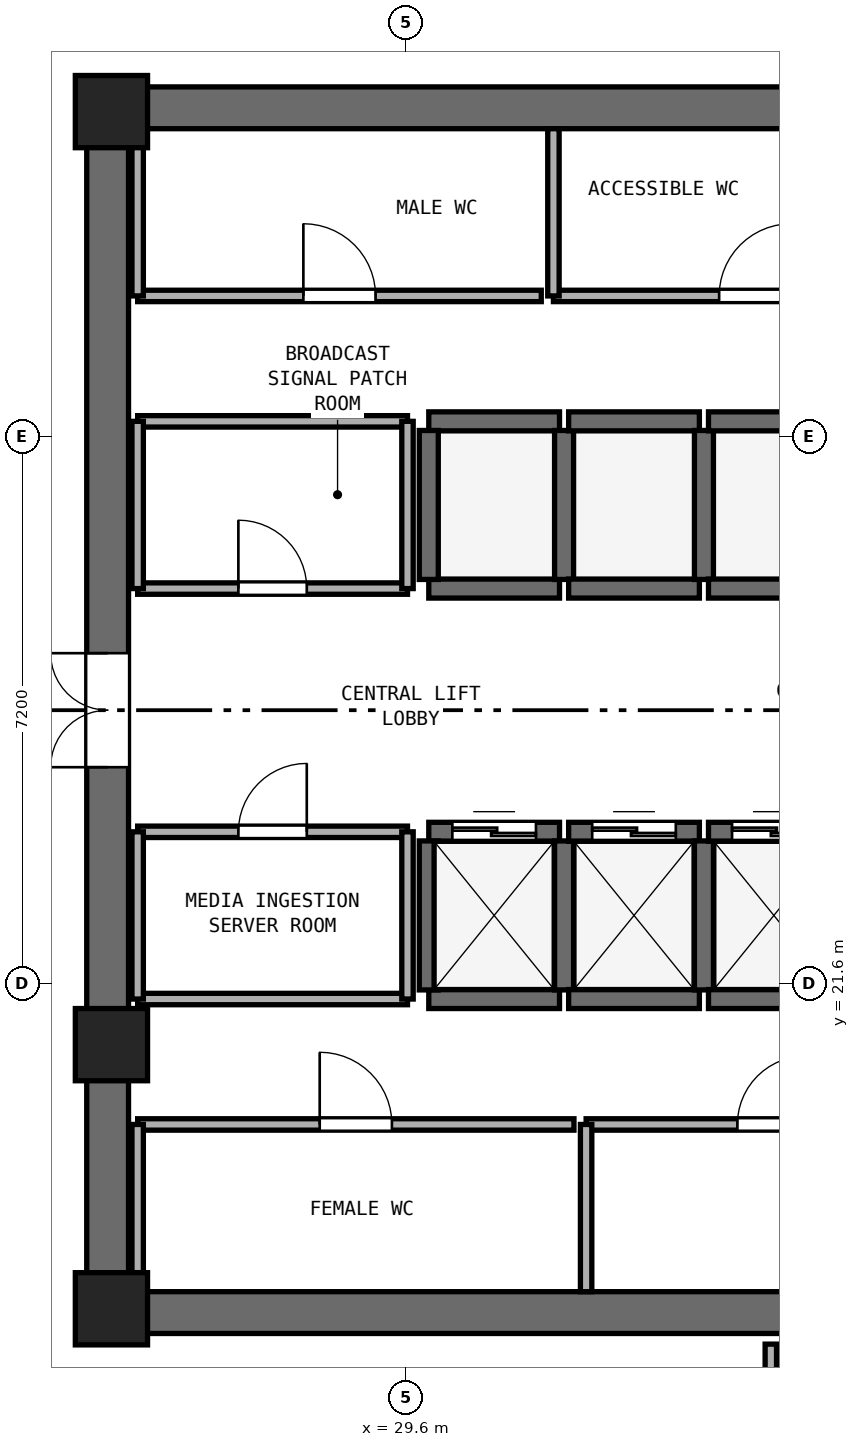
"""IFC4 building model, lengths in metres.
Left out: names, types, materials, properties, quantities, classifications, styles, units other than length and angle.
Written with IfcOpenShell. Run it as: python <this file> out.ifc"""

import sys

from ifc_helpers import new_model, si_unit, direction, frame, frame_2d, origin, origin_2d, place, context, subcontext, project, spatial, rectangle, extrude, element, fill, save


model = new_model("IFC4")
c1 = context("Model", 3, precision=1e-05, world=origin(), true_north=direction((0.0, 1.0)))
c2 = subcontext(c1, "Body", "Model", "MODEL_VIEW")
j1 = project(units=[si_unit("LENGTHUNIT", "METRE"), si_unit("PLANEANGLEUNIT", "RADIAN")], contexts=[c1])
p1 = place(None, origin())
s1 = spatial("IfcSite", under=j1, at=p1, CompositionType="ELEMENT")
p2 = place(p1, origin())
s2 = spatial("IfcBuilding", under=s1, at=p2, CompositionType="ELEMENT")
p3 = place(p2, frame((0.0, 0.0, 201.0)))
s3 = spatial("IfcBuildingStorey", under=s2, at=p3, CompositionType="ELEMENT", Elevation=201.0)
for number, where, z_axis, x_axis in (
    (1, (25.4, 17.275, 0.0), (0.0, 0.0, 1.0), (1.0, 0.0, 0.0)),
    (2, (25.4, 33.125, 0.0), (0.0, 0.0, 1.0), (1.0, 0.0, 0.0)),
):
    element("IfcWall", number, at=place(p3, frame(where, z_axis=z_axis, x_axis=x_axis)), inside=s3, PredefinedType="SHEAR", context=c2, shape_type="SweptSolid", body=[
        extrude(rectangle(XDim=23.2, YDim=0.55, at=frame_2d((11.6, 0.0))), origin(), (0.0, 0.0, 1.0), 3.54),
    ])
p4 = place(p3, frame((25.675, 17.55, 0.0), z_axis=(0.0, 0.0, 1.0), x_axis=(0.0, 1.0, 0.0)))
e3 = element("IfcWall", 3, at=p4, inside=s3, PredefinedType="SHEAR", context=c2, shape_type="SweptSolid", body=[
    extrude(rectangle(XDim=15.3, YDim=0.55, at=frame_2d((7.65, 0.0))), origin(), (0.0, 0.0, 1.0), 3.54),
])
p5 = place(p4, frame((6.9, 0.0, 0.0)))
e4 = element("IfcOpeningElement", 4, at=p5, cuts=e3, PredefinedType="OPENING", context=c2, shape_type="SweptSolid", body=[
    extrude(rectangle(XDim=1.5, YDim=2.15, at=frame_2d((0.75, 1.075))), frame((0.0, 0.285, 0.0), z_axis=(0.0, -1.0, 0.0), x_axis=(1.0, 0.0, 0.0)), (0.0, 0.0, 1.0), 0.57),
])
for number, where, z_axis, x_axis in (
    (5, (25.725, 17.325, 0.0), (0.0, 0.0, 1.0), (1.0, 0.0, 0.0)),
    (6, (25.725, 33.075, 0.0), (0.0, 0.0, 1.0), (1.0, 0.0, 0.0)),
    (7, (25.725, 20.8, 0.0), (0.0, 0.0, 1.0), (1.0, 0.0, 0.0)),
):
    element("IfcColumn", number, at=place(p3, frame(where, z_axis=z_axis, x_axis=x_axis)), inside=s3, PredefinedType="PILASTER", context=c2, shape_type="SweptSolid", body=[
        extrude(rectangle(XDim=0.95, YDim=0.95, at=origin_2d()), origin(), (0.0, 0.0, 1.0), 3.8),
    ])
p6 = place(p3, frame((29.9, 21.4, 0.0), z_axis=(0.0, 0.0, 1.0), x_axis=(1.0, 0.0, 0.0)))
e8 = element("IfcWall", 8, at=p6, inside=s3, PredefinedType="SHEAR", context=c2, shape_type="SweptSolid", body=[
    extrude(rectangle(XDim=1.72, YDim=0.25, at=frame_2d((0.86, 0.0))), origin(), (0.0, 0.0, 1.0), 3.54),
])
p7 = place(p3, frame((29.9, 23.6, 0.0), z_axis=(0.0, 0.0, 1.0), x_axis=(1.0, 0.0, 0.0)))
e9 = element("IfcWall", 9, at=p7, inside=s3, PredefinedType="SHEAR", context=c2, shape_type="SweptSolid", body=[
    extrude(rectangle(XDim=1.72, YDim=0.25, at=frame_2d((0.86, 0.0))), origin(), (0.0, 0.0, 1.0), 3.54),
])
p8 = place(p7, frame((0.31, 0.0, 0.0)))
e10 = element("IfcOpeningElement", 10, at=p8, cuts=e9, PredefinedType="OPENING", context=c2, shape_type="SweptSolid", body=[
    extrude(rectangle(XDim=1.1, YDim=2.15, at=frame_2d((0.55, 1.075))), frame((0.0, 0.135, 0.0), z_axis=(0.0, -1.0, 0.0), x_axis=(1.0, 0.0, 0.0)), (0.0, 0.0, 1.0), 0.27),
])
for number, where, z_axis, x_axis in (
    (11, (29.9, 21.52, 0.0), (0.0, 0.0, 1.0), (0.0, 1.0, 0.0)),
    (12, (31.68, 21.52, 0.0), (0.0, 0.0, 1.0), (0.0, 1.0, 0.0)),
):
    element("IfcWall", number, at=place(p3, frame(where, z_axis=z_axis, x_axis=x_axis)), inside=s3, PredefinedType="SHEAR", context=c2, shape_type="SweptSolid", body=[
        extrude(rectangle(XDim=1.96, YDim=0.25, at=frame_2d((0.98, 0.0))), origin(), (0.0, 0.0, 1.0), 3.54),
    ])
p9 = place(p3, frame((31.74, 21.4, 0.0), z_axis=(0.0, 0.0, 1.0), x_axis=(1.0, 0.0, 0.0)))
e13 = element("IfcWall", 13, at=p9, inside=s3, PredefinedType="SHEAR", context=c2, shape_type="SweptSolid", body=[
    extrude(rectangle(XDim=1.72, YDim=0.25, at=frame_2d((0.86, 0.0))), origin(), (0.0, 0.0, 1.0), 3.54),
])
p10 = place(p3, frame((31.74, 23.6, 0.0), z_axis=(0.0, 0.0, 1.0), x_axis=(1.0, 0.0, 0.0)))
e14 = element("IfcWall", 14, at=p10, inside=s3, PredefinedType="SHEAR", context=c2, shape_type="SweptSolid", body=[
    extrude(rectangle(XDim=1.72, YDim=0.25, at=frame_2d((0.86, 0.0))), origin(), (0.0, 0.0, 1.0), 3.54),
])
p11 = place(p10, frame((0.31, 0.0, 0.0)))
e15 = element("IfcOpeningElement", 15, at=p11, cuts=e14, PredefinedType="OPENING", context=c2, shape_type="SweptSolid", body=[
    extrude(rectangle(XDim=1.1, YDim=2.15, at=frame_2d((0.55, 1.075))), frame((0.0, 0.135, 0.0), z_axis=(0.0, -1.0, 0.0), x_axis=(1.0, 0.0, 0.0)), (0.0, 0.0, 1.0), 0.27),
])
p12 = place(p3, frame((33.52, 21.52, 0.0), z_axis=(0.0, 0.0, 1.0), x_axis=(0.0, 1.0, 0.0)))
e16 = element("IfcWall", 16, at=p12, inside=s3, PredefinedType="SHEAR", context=c2, shape_type="SweptSolid", body=[
    extrude(rectangle(XDim=1.96, YDim=0.25, at=frame_2d((0.98, 0.0))), origin(), (0.0, 0.0, 1.0), 3.54),
])
p13 = place(p3, frame((33.58, 21.4, 0.0), z_axis=(0.0, 0.0, 1.0), x_axis=(1.0, 0.0, 0.0)))
e17 = element("IfcWall", 17, at=p13, inside=s3, PredefinedType="SHEAR", context=c2, shape_type="SweptSolid", body=[
    extrude(rectangle(XDim=1.72, YDim=0.25, at=frame_2d((0.86, 0.0))), origin(), (0.0, 0.0, 1.0), 3.54),
])
p14 = place(p3, frame((33.58, 23.6, 0.0), z_axis=(0.0, 0.0, 1.0), x_axis=(1.0, 0.0, 0.0)))
e18 = element("IfcWall", 18, at=p14, inside=s3, PredefinedType="SHEAR", context=c2, shape_type="SweptSolid", body=[
    extrude(rectangle(XDim=1.72, YDim=0.25, at=frame_2d((0.86, 0.0))), origin(), (0.0, 0.0, 1.0), 3.54),
])
p15 = place(p14, frame((0.31, 0.0, 0.0)))
e19 = element("IfcOpeningElement", 19, at=p15, cuts=e18, PredefinedType="OPENING", context=c2, shape_type="SweptSolid", body=[
    extrude(rectangle(XDim=1.1, YDim=2.15, at=frame_2d((0.55, 1.075))), frame((0.0, 0.135, 0.0), z_axis=(0.0, -1.0, 0.0), x_axis=(1.0, 0.0, 0.0)), (0.0, 0.0, 1.0), 0.27),
])
for number, where, z_axis, x_axis in (
    (20, (29.9, 26.8, 0.0), (0.0, 0.0, 1.0), (1.0, 0.0, 0.0)),
    (21, (29.9, 29.0, 0.0), (0.0, 0.0, 1.0), (1.0, 0.0, 0.0)),
):
    element("IfcWall", number, at=place(p3, frame(where, z_axis=z_axis, x_axis=x_axis)), inside=s3, PredefinedType="SHEAR", context=c2, shape_type="SweptSolid", body=[
        extrude(rectangle(XDim=1.72, YDim=0.25, at=frame_2d((0.86, 0.0))), origin(), (0.0, 0.0, 1.0), 3.54),
    ])
for number, where, z_axis, x_axis in (
    (22, (29.9, 26.92, 0.0), (0.0, 0.0, 1.0), (0.0, 1.0, 0.0)),
    (23, (31.68, 26.92, 0.0), (0.0, 0.0, 1.0), (0.0, 1.0, 0.0)),
):
    element("IfcWall", number, at=place(p3, frame(where, z_axis=z_axis, x_axis=x_axis)), inside=s3, PredefinedType="SHEAR", context=c2, shape_type="SweptSolid", body=[
        extrude(rectangle(XDim=1.96, YDim=0.25, at=frame_2d((0.98, 0.0))), origin(), (0.0, 0.0, 1.0), 3.54),
    ])
for number, where, z_axis, x_axis in (
    (24, (31.74, 26.8, 0.0), (0.0, 0.0, 1.0), (1.0, 0.0, 0.0)),
    (25, (31.74, 29.0, 0.0), (0.0, 0.0, 1.0), (1.0, 0.0, 0.0)),
):
    element("IfcWall", number, at=place(p3, frame(where, z_axis=z_axis, x_axis=x_axis)), inside=s3, PredefinedType="SHEAR", context=c2, shape_type="SweptSolid", body=[
        extrude(rectangle(XDim=1.72, YDim=0.25, at=frame_2d((0.86, 0.0))), origin(), (0.0, 0.0, 1.0), 3.54),
    ])
p16 = place(p3, frame((33.52, 26.92, 0.0), z_axis=(0.0, 0.0, 1.0), x_axis=(0.0, 1.0, 0.0)))
e26 = element("IfcWall", 26, at=p16, inside=s3, PredefinedType="SHEAR", context=c2, shape_type="SweptSolid", body=[
    extrude(rectangle(XDim=1.96, YDim=0.25, at=frame_2d((0.98, 0.0))), origin(), (0.0, 0.0, 1.0), 3.54),
])
for number, where, z_axis, x_axis in (
    (27, (33.58, 26.8, 0.0), (0.0, 0.0, 1.0), (1.0, 0.0, 0.0)),
    (28, (33.58, 29.0, 0.0), (0.0, 0.0, 1.0), (1.0, 0.0, 0.0)),
):
    element("IfcWall", number, at=place(p3, frame(where, z_axis=z_axis, x_axis=x_axis)), inside=s3, PredefinedType="SHEAR", context=c2, shape_type="SweptSolid", body=[
        extrude(rectangle(XDim=1.72, YDim=0.25, at=frame_2d((0.86, 0.0))), origin(), (0.0, 0.0, 1.0), 3.54),
    ])
p17 = place(p3, frame((26.07, 30.65, 0.0), z_axis=(0.0, 0.0, 1.0), x_axis=(1.0, 0.0, 0.0)))
e29 = element("IfcWall", 29, at=p17, inside=s3, PredefinedType="PARTITIONING", context=c2, shape_type="SweptSolid", body=[
    extrude(rectangle(XDim=5.31, YDim=0.15, at=frame_2d((2.655, 0.0))), origin(), (0.0, 0.0, 1.0), 3.54),
])
p18 = place(p17, frame((2.18, 0.0, 0.0)))
e30 = element("IfcOpeningElement", 30, at=p18, cuts=e29, PredefinedType="OPENING", context=c2, shape_type="SweptSolid", body=[
    extrude(rectangle(XDim=0.95, YDim=2.1, at=frame_2d((0.475, 1.05))), frame((0.0, 0.085, 0.0), z_axis=(0.0, -1.0, 0.0), x_axis=(1.0, 0.0, 0.0)), (0.0, 0.0, 1.0), 0.17),
])
p19 = place(p3, frame((26.07, 30.65, 0.0), z_axis=(0.0, 0.0, 1.0), x_axis=(0.0, 1.0, 0.0)))
e31 = element("IfcWall", 31, at=p19, inside=s3, PredefinedType="PARTITIONING", context=c2, shape_type="SweptSolid", body=[
    extrude(rectangle(XDim=2.2, YDim=0.15, at=frame_2d((1.1, 0.0))), origin(), (0.0, 0.0, 1.0), 2.64),
])
p20 = place(p3, frame((31.54, 30.65, 0.0), z_axis=(0.0, 0.0, 1.0), x_axis=(1.0, 0.0, 0.0)))
e32 = element("IfcWall", 32, at=p20, inside=s3, PredefinedType="PARTITIONING", context=c2, shape_type="SweptSolid", body=[
    extrude(rectangle(XDim=5.31, YDim=0.15, at=frame_2d((2.655, 0.0))), origin(), (0.0, 0.0, 1.0), 3.54),
])
p21 = place(p20, frame((2.18, 0.0, 0.0)))
e33 = element("IfcOpeningElement", 33, at=p21, cuts=e32, PredefinedType="OPENING", context=c2, shape_type="SweptSolid", body=[
    extrude(rectangle(XDim=0.95, YDim=2.1, at=frame_2d((0.475, 1.05))), frame((0.0, 0.085, 0.0), z_axis=(0.0, -1.0, 0.0), x_axis=(1.0, 0.0, 0.0)), (0.0, 0.0, 1.0), 0.17),
])
p22 = place(p3, frame((31.54, 30.65, 0.0), z_axis=(0.0, 0.0, 1.0), x_axis=(0.0, 1.0, 0.0)))
e34 = element("IfcWall", 34, at=p22, inside=s3, PredefinedType="PARTITIONING", context=c2, shape_type="SweptSolid", body=[
    extrude(rectangle(XDim=2.2, YDim=0.15, at=frame_2d((1.1, 0.0))), origin(), (0.0, 0.0, 1.0), 3.54),
])
p23 = place(p3, frame((26.07, 19.75, 0.0), z_axis=(0.0, 0.0, 1.0), x_axis=(1.0, 0.0, 0.0)))
e35 = element("IfcWall", 35, at=p23, inside=s3, PredefinedType="PARTITIONING", context=c2, shape_type="SweptSolid", body=[
    extrude(rectangle(XDim=5.74, YDim=0.15, at=frame_2d((2.87, 0.0))), origin(), (0.0, 0.0, 1.0), 3.54),
])
p24 = place(p23, frame((2.395, 0.0, 0.0)))
e36 = element("IfcOpeningElement", 36, at=p24, cuts=e35, PredefinedType="OPENING", context=c2, shape_type="SweptSolid", body=[
    extrude(rectangle(XDim=0.95, YDim=2.1, at=frame_2d((0.475, 1.05))), frame((0.0, 0.085, 0.0), z_axis=(0.0, -1.0, 0.0), x_axis=(1.0, 0.0, 0.0)), (0.0, 0.0, 1.0), 0.17),
])
p25 = place(p3, frame((26.07, 17.55, 0.0), z_axis=(0.0, 0.0, 1.0), x_axis=(0.0, 1.0, 0.0)))
e37 = element("IfcWall", 37, at=p25, inside=s3, PredefinedType="PARTITIONING", context=c2, shape_type="SweptSolid", body=[
    extrude(rectangle(XDim=2.2, YDim=0.15, at=frame_2d((1.1, 0.0))), origin(), (0.0, 0.0, 1.0), 2.64),
])
p26 = place(p3, frame((31.97, 19.75, 0.0), z_axis=(0.0, 0.0, 1.0), x_axis=(1.0, 0.0, 0.0)))
e38 = element("IfcWall", 38, at=p26, inside=s3, PredefinedType="PARTITIONING", context=c2, shape_type="SweptSolid", body=[
    extrude(rectangle(XDim=4.88, YDim=0.15, at=frame_2d((2.44, 0.0))), origin(), (0.0, 0.0, 1.0), 3.54),
])
p27 = place(p26, frame((1.99, 0.0, 0.0)))
e39 = element("IfcOpeningElement", 39, at=p27, cuts=e38, PredefinedType="OPENING", context=c2, shape_type="SweptSolid", body=[
    extrude(rectangle(XDim=0.9, YDim=2.1, at=frame_2d((0.45, 1.05))), frame((0.0, 0.085, 0.0), z_axis=(0.0, -1.0, 0.0), x_axis=(1.0, 0.0, 0.0)), (0.0, 0.0, 1.0), 0.17),
])
p28 = place(p3, frame((31.97, 17.55, 0.0), z_axis=(0.0, 0.0, 1.0), x_axis=(0.0, 1.0, 0.0)))
e40 = element("IfcWall", 40, at=p28, inside=s3, PredefinedType="PARTITIONING", context=c2, shape_type="SweptSolid", body=[
    extrude(rectangle(XDim=2.2, YDim=0.15, at=frame_2d((1.1, 0.0))), origin(), (0.0, 0.0, 1.0), 3.54),
])
p29 = place(p3, frame((26.07, 26.8, 0.0), z_axis=(0.0, 0.0, 1.0), x_axis=(1.0, 0.0, 0.0)))
e41 = element("IfcWall", 41, at=p29, inside=s3, PredefinedType="PARTITIONING", context=c2, shape_type="SweptSolid", body=[
    extrude(rectangle(XDim=3.55, YDim=0.15, at=frame_2d((1.775, 0.0))), origin(), (0.0, 0.0, 1.0), 3.54),
])
p30 = place(p29, frame((1.325, 0.0, 0.0)))
e42 = element("IfcOpeningElement", 42, at=p30, cuts=e41, PredefinedType="OPENING", context=c2, shape_type="SweptSolid", body=[
    extrude(rectangle(XDim=0.9, YDim=2.1, at=frame_2d((0.45, 1.05))), frame((0.0, 0.085, 0.0), z_axis=(0.0, -1.0, 0.0), x_axis=(1.0, 0.0, 0.0)), (0.0, 0.0, 1.0), 0.17),
])
p31 = place(p3, frame((26.07, 29.0, 0.0), z_axis=(0.0, 0.0, 1.0), x_axis=(1.0, 0.0, 0.0)))
e43 = element("IfcWall", 43, at=p31, inside=s3, PredefinedType="PARTITIONING", context=c2, shape_type="SweptSolid", body=[
    extrude(rectangle(XDim=3.55, YDim=0.15, at=frame_2d((1.775, 0.0))), origin(), (0.0, 0.0, 1.0), 3.54),
])
p32 = place(p3, frame((26.07, 26.8, 0.0), z_axis=(0.0, 0.0, 1.0), x_axis=(0.0, 1.0, 0.0)))
e44 = element("IfcWall", 44, at=p32, inside=s3, PredefinedType="PARTITIONING", context=c2, shape_type="SweptSolid", body=[
    extrude(rectangle(XDim=2.2, YDim=0.15, at=frame_2d((1.1, 0.0))), origin(), (0.0, 0.0, 1.0), 2.64),
])
p33 = place(p3, frame((29.62, 26.8, 0.0), z_axis=(0.0, 0.0, 1.0), x_axis=(0.0, 1.0, 0.0)))
e45 = element("IfcWall", 45, at=p33, inside=s3, PredefinedType="PARTITIONING", context=c2, shape_type="SweptSolid", body=[
    extrude(rectangle(XDim=2.2, YDim=0.15, at=frame_2d((1.1, 0.0))), origin(), (0.0, 0.0, 1.0), 3.54),
])
p34 = place(p3, frame((26.07, 21.4, 0.0), z_axis=(0.0, 0.0, 1.0), x_axis=(1.0, 0.0, 0.0)))
e46 = element("IfcWall", 46, at=p34, inside=s3, PredefinedType="PARTITIONING", context=c2, shape_type="SweptSolid", body=[
    extrude(rectangle(XDim=3.55, YDim=0.15, at=frame_2d((1.775, 0.0))), origin(), (0.0, 0.0, 1.0), 3.54),
])
p35 = place(p3, frame((26.07, 23.6, 0.0), z_axis=(0.0, 0.0, 1.0), x_axis=(1.0, 0.0, 0.0)))
e47 = element("IfcWall", 47, at=p35, inside=s3, PredefinedType="PARTITIONING", context=c2, shape_type="SweptSolid", body=[
    extrude(rectangle(XDim=3.55, YDim=0.15, at=frame_2d((1.775, 0.0))), origin(), (0.0, 0.0, 1.0), 3.54),
])
p36 = place(p35, frame((1.325, 0.0, 0.0)))
e48 = element("IfcOpeningElement", 48, at=p36, cuts=e47, PredefinedType="OPENING", context=c2, shape_type="SweptSolid", body=[
    extrude(rectangle(XDim=0.9, YDim=2.1, at=frame_2d((0.45, 1.05))), frame((0.0, 0.085, 0.0), z_axis=(0.0, -1.0, 0.0), x_axis=(1.0, 0.0, 0.0)), (0.0, 0.0, 1.0), 0.17),
])
p37 = place(p3, frame((26.07, 21.4, 0.0), z_axis=(0.0, 0.0, 1.0), x_axis=(0.0, 1.0, 0.0)))
e49 = element("IfcWall", 49, at=p37, inside=s3, PredefinedType="PARTITIONING", context=c2, shape_type="SweptSolid", body=[
    extrude(rectangle(XDim=2.2, YDim=0.15, at=frame_2d((1.1, 0.0))), origin(), (0.0, 0.0, 1.0), 2.64),
])
p38 = place(p3, frame((29.62, 21.4, 0.0), z_axis=(0.0, 0.0, 1.0), x_axis=(0.0, 1.0, 0.0)))
e50 = element("IfcWall", 50, at=p38, inside=s3, PredefinedType="PARTITIONING", context=c2, shape_type="SweptSolid", body=[
    extrude(rectangle(XDim=2.2, YDim=0.15, at=frame_2d((1.1, 0.0))), origin(), (0.0, 0.0, 1.0), 3.54),
])
p39 = place(p3, frame((34.4, 15.35, 0.0), z_axis=(0.0, 0.0, 1.0), x_axis=(0.0, 1.0, 0.0)))
e51 = element("IfcWall", 51, at=p39, inside=s3, PredefinedType="PARTITIONING", context=c2, shape_type="SweptSolid", body=[
    extrude(rectangle(XDim=1.51, YDim=0.15, at=frame_2d((0.755, 0.0))), origin(), (0.0, 0.0, 1.0), 3.54),
])
p40 = place(p8, origin())
e52 = element("IfcDoor", 52, at=p40, inside=s3, OperationType="DOUBLE_DOOR_SLIDING", PredefinedType="DOOR", context=c2, shape_type="SweptSolid", body=[
    extrude(rectangle(XDim=1.1, YDim=2.15, at=frame_2d((0.55, 1.075))), frame((0.0, 0.025, 0.0), z_axis=(0.0, -1.0, 0.0), x_axis=(1.0, 0.0, 0.0)), (0.0, 0.0, 1.0), 0.05),
])
fill(e10, e52)
p41 = place(p11, origin())
e53 = element("IfcDoor", 53, at=p41, inside=s3, OperationType="DOUBLE_DOOR_SLIDING", PredefinedType="DOOR", context=c2, shape_type="SweptSolid", body=[
    extrude(rectangle(XDim=1.1, YDim=2.15, at=frame_2d((0.55, 1.075))), frame((0.0, 0.025, 0.0), z_axis=(0.0, -1.0, 0.0), x_axis=(1.0, 0.0, 0.0)), (0.0, 0.0, 1.0), 0.05),
])
fill(e15, e53)
p42 = place(p15, origin())
e54 = element("IfcDoor", 54, at=p42, inside=s3, OperationType="DOUBLE_DOOR_SLIDING", PredefinedType="DOOR", context=c2, shape_type="SweptSolid", body=[
    extrude(rectangle(XDim=1.1, YDim=2.15, at=frame_2d((0.55, 1.075))), frame((0.0, 0.025, 0.0), z_axis=(0.0, -1.0, 0.0), x_axis=(1.0, 0.0, 0.0)), (0.0, 0.0, 1.0), 0.05),
])
fill(e19, e54)
p43 = place(p5, origin())
e55 = element("IfcDoor", 55, at=p43, inside=s3, OperationType="DOUBLE_DOOR_SINGLE_SWING", PredefinedType="DOOR", context=c2, shape_type="SweptSolid", body=[
    extrude(rectangle(XDim=1.5, YDim=2.15, at=frame_2d((0.75, 1.075))), frame((0.0, 0.025, 0.0), z_axis=(0.0, -1.0, 0.0), x_axis=(1.0, 0.0, 0.0)), (0.0, 0.0, 1.0), 0.05),
])
fill(e4, e55)
p44 = place(p18, origin())
e56 = element("IfcDoor", 56, at=p44, inside=s3, OperationType="SINGLE_SWING_LEFT", PredefinedType="DOOR", context=c2, shape_type="SweptSolid", body=[
    extrude(rectangle(XDim=0.95, YDim=2.1, at=frame_2d((0.475, 1.05))), frame((0.0, 0.025, 0.0), z_axis=(0.0, -1.0, 0.0), x_axis=(1.0, 0.0, 0.0)), (0.0, 0.0, 1.0), 0.05),
])
fill(e30, e56)
p45 = place(p21, origin())
e57 = element("IfcDoor", 57, at=p45, inside=s3, OperationType="SINGLE_SWING_RIGHT", PredefinedType="DOOR", context=c2, shape_type="SweptSolid", body=[
    extrude(rectangle(XDim=0.95, YDim=2.1, at=frame_2d((0.475, 1.05))), frame((0.0, 0.025, 0.0), z_axis=(0.0, -1.0, 0.0), x_axis=(1.0, 0.0, 0.0)), (0.0, 0.0, 1.0), 0.05),
])
fill(e33, e57)
p46 = place(p24, origin())
e58 = element("IfcDoor", 58, at=p46, inside=s3, OperationType="SINGLE_SWING_LEFT", PredefinedType="DOOR", context=c2, shape_type="SweptSolid", body=[
    extrude(rectangle(XDim=0.95, YDim=2.1, at=frame_2d((0.475, 1.05))), frame((0.0, 0.025, 0.0), z_axis=(0.0, -1.0, 0.0), x_axis=(1.0, 0.0, 0.0)), (0.0, 0.0, 1.0), 0.05),
])
fill(e36, e58)
p47 = place(p27, origin())
e59 = element("IfcDoor", 59, at=p47, inside=s3, OperationType="SINGLE_SWING_RIGHT", PredefinedType="DOOR", context=c2, shape_type="SweptSolid", body=[
    extrude(rectangle(XDim=0.9, YDim=2.1, at=frame_2d((0.45, 1.05))), frame((0.0, 0.025, 0.0), z_axis=(0.0, -1.0, 0.0), x_axis=(1.0, 0.0, 0.0)), (0.0, 0.0, 1.0), 0.05),
])
fill(e39, e59)
p48 = place(p30, origin())
e60 = element("IfcDoor", 60, at=p48, inside=s3, OperationType="SINGLE_SWING_LEFT", PredefinedType="DOOR", context=c2, shape_type="SweptSolid", body=[
    extrude(rectangle(XDim=0.9, YDim=2.1, at=frame_2d((0.45, 1.05))), frame((0.0, 0.025, 0.0), z_axis=(0.0, -1.0, 0.0), x_axis=(1.0, 0.0, 0.0)), (0.0, 0.0, 1.0), 0.05),
])
fill(e42, e60)
p49 = place(p36, origin())
e61 = element("IfcDoor", 61, at=p49, inside=s3, OperationType="SINGLE_SWING_RIGHT", PredefinedType="DOOR", context=c2, shape_type="SweptSolid", body=[
    extrude(rectangle(XDim=0.9, YDim=2.1, at=frame_2d((0.45, 1.05))), frame((0.0, 0.025, 0.0), z_axis=(0.0, -1.0, 0.0), x_axis=(1.0, 0.0, 0.0)), (0.0, 0.0, 1.0), 0.05),
])
fill(e48, e61)
save(model, sys.argv[1])
